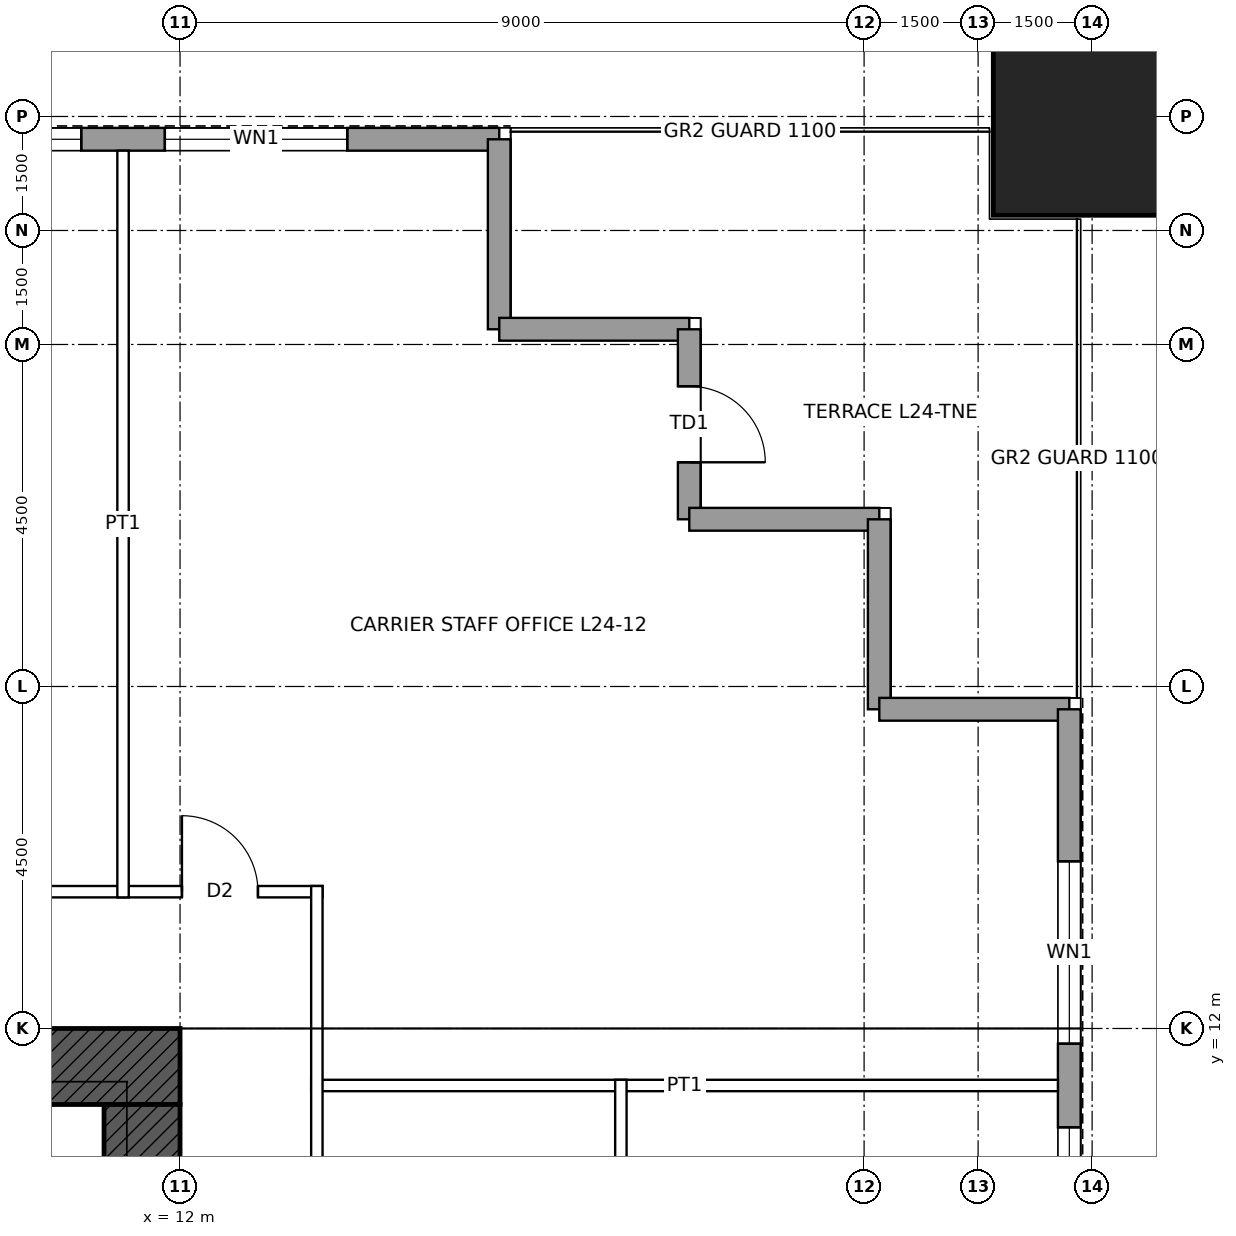
"""IFC4 building model, lengths in metres.
Left out: names, types, materials, properties, quantities, classifications, styles, units other than length and angle.
Written with IfcOpenShell. Run it as: python <this file> out.ifc"""

import sys

from ifc_helpers import new_model, si_unit, direction, frame, frame_2d, origin, origin_2d, place, context, subcontext, project, spatial, rectangle, hollow_rectangle, extrude, element, fill, save


model = new_model("IFC4")
c1 = context("Model", 3, precision=1e-05, world=origin(), true_north=direction((0.0, 1.0)))
c2 = subcontext(c1, "Body", "Model", "MODEL_VIEW")
j1 = project(units=[si_unit("LENGTHUNIT", "METRE"), si_unit("PLANEANGLEUNIT", "RADIAN")], contexts=[c1])
p1 = place(None, origin())
s1 = spatial("IfcSite", under=j1, at=p1, CompositionType="ELEMENT")
p2 = place(p1, origin())
s2 = spatial("IfcBuilding", under=s1, at=p2, CompositionType="ELEMENT")
p3 = place(p2, frame((0.0, 0.0, 122.4)))
s3 = spatial("IfcBuildingStorey", under=s2, at=p3, CompositionType="ELEMENT", Elevation=122.4)
p4 = place(p3, frame((24.0, 24.0, 0.0), z_axis=(0.0, 0.0, 1.0), x_axis=(1.0, 0.0, 0.0)))
e1 = element("IfcColumn", 1, at=p4, inside=s3, PredefinedType="COLUMN", context=c2, shape_type="SweptSolid", body=[
    extrude(hollow_rectangle(XDim=2.6, YDim=2.6, WallThickness=0.13, at=origin_2d()), origin(), (0.0, 0.0, 1.0), 4.5),
])
p5 = place(p3, frame((-12.0, 11.5, 0.0), z_axis=(0.0, 0.0, 1.0), x_axis=(1.0, 0.0, 0.0)))
e2 = element("IfcWall", 2, at=p5, inside=s3, PredefinedType="SHEAR", context=c2, shape_type="SweptSolid", body=[
    extrude(rectangle(XDim=24.0, YDim=1.0, at=frame_2d((12.0, 0.0))), origin(), (0.0, 0.0, 1.0), 4.5),
])
p6 = place(p5, frame((6.25, 0.0, 0.0)))
e3 = element("IfcOpeningElement", 3, at=p6, cuts=e2, PredefinedType="OPENING", context=c2, shape_type="SweptSolid", body=[
    extrude(rectangle(XDim=1.0, YDim=2.4, at=frame_2d((0.5, 1.2))), frame((0.0, 0.51, 0.0), z_axis=(0.0, -1.0, 0.0), x_axis=(1.0, 0.0, 0.0)), (0.0, 0.0, 1.0), 1.02),
])
p7 = place(p5, frame((16.75, 0.0, 0.0)))
e4 = element("IfcOpeningElement", 4, at=p7, cuts=e2, PredefinedType="OPENING", context=c2, shape_type="SweptSolid", body=[
    extrude(rectangle(XDim=1.0, YDim=2.4, at=frame_2d((0.5, 1.2))), frame((0.0, 0.51, 0.0), z_axis=(0.0, -1.0, 0.0), x_axis=(1.0, 0.0, 0.0)), (0.0, 0.0, 1.0), 1.02),
])
p8 = place(p3, frame((11.5, 11.0, 0.0), z_axis=(0.0, 0.0, 1.0), x_axis=(0.0, -1.0, 0.0)))
e5 = element("IfcWall", 5, at=p8, inside=s3, PredefinedType="SHEAR", context=c2, shape_type="SweptSolid", body=[
    extrude(rectangle(XDim=22.0, YDim=1.0, at=frame_2d((11.0, 0.0))), origin(), (0.0, 0.0, 1.0), 4.5),
])
p9 = place(p8, frame((10.5, 0.0, 0.0)))
e6 = element("IfcOpeningElement", 6, at=p9, cuts=e5, PredefinedType="OPENING", context=c2, shape_type="SweptSolid", body=[
    extrude(rectangle(XDim=1.0, YDim=2.4, at=frame_2d((0.5, 1.2))), frame((0.0, 0.51, 0.0), z_axis=(0.0, -1.0, 0.0), x_axis=(1.0, 0.0, 0.0)), (0.0, 0.0, 1.0), 1.02),
])
p10 = place(p3, frame((-16.2, 23.7, 0.0), z_axis=(0.0, 0.0, 1.0), x_axis=(1.0, 0.0, 0.0)))
e7 = element("IfcWall", 7, at=p10, inside=s3, PredefinedType="SOLIDWALL", context=c2, shape_type="SweptSolid", body=[
    extrude(rectangle(XDim=32.4, YDim=0.3, at=frame_2d((16.2, 0.0))), origin(), (0.0, 0.0, 1.0), 4.3),
])
p11 = place(p10, frame((2.0, 0.0, 1.0)))
e8 = element("IfcOpeningElement", 8, at=p11, cuts=e7, PredefinedType="OPENING", context=c2, shape_type="SweptSolid", body=[
    extrude(rectangle(XDim=2.4, YDim=1.2, at=frame_2d((1.2, 0.6))), frame((0.0, 0.16, 0.0), z_axis=(0.0, -1.0, 0.0), x_axis=(1.0, 0.0, 0.0)), (0.0, 0.0, 1.0), 0.32),
])
p12 = place(p10, frame((5.5, 0.0, 1.0)))
e9 = element("IfcOpeningElement", 9, at=p12, cuts=e7, PredefinedType="OPENING", context=c2, shape_type="SweptSolid", body=[
    extrude(rectangle(XDim=2.4, YDim=1.2, at=frame_2d((1.2, 0.6))), frame((0.0, 0.16, 0.0), z_axis=(0.0, -1.0, 0.0), x_axis=(1.0, 0.0, 0.0)), (0.0, 0.0, 1.0), 0.32),
])
p13 = place(p10, frame((8.6, 0.0, 1.0)))
e10 = element("IfcOpeningElement", 10, at=p13, cuts=e7, PredefinedType="OPENING", context=c2, shape_type="SweptSolid", body=[
    extrude(rectangle(XDim=2.4, YDim=1.2, at=frame_2d((1.2, 0.6))), frame((0.0, 0.16, 0.0), z_axis=(0.0, -1.0, 0.0), x_axis=(1.0, 0.0, 0.0)), (0.0, 0.0, 1.0), 0.32),
])
p14 = place(p10, frame((13.65, 0.0, 1.0)))
e11 = element("IfcOpeningElement", 11, at=p14, cuts=e7, PredefinedType="OPENING", context=c2, shape_type="SweptSolid", body=[
    extrude(rectangle(XDim=2.4, YDim=1.2, at=frame_2d((1.2, 0.6))), frame((0.0, 0.16, 0.0), z_axis=(0.0, -1.0, 0.0), x_axis=(1.0, 0.0, 0.0)), (0.0, 0.0, 1.0), 0.32),
])
p15 = place(p10, frame((16.35, 0.0, 1.0)))
e12 = element("IfcOpeningElement", 12, at=p15, cuts=e7, PredefinedType="OPENING", context=c2, shape_type="SweptSolid", body=[
    extrude(rectangle(XDim=2.4, YDim=1.2, at=frame_2d((1.2, 0.6))), frame((0.0, 0.16, 0.0), z_axis=(0.0, -1.0, 0.0), x_axis=(1.0, 0.0, 0.0)), (0.0, 0.0, 1.0), 0.32),
])
p16 = place(p10, frame((21.4, 0.0, 1.0)))
e13 = element("IfcOpeningElement", 13, at=p16, cuts=e7, PredefinedType="OPENING", context=c2, shape_type="SweptSolid", body=[
    extrude(rectangle(XDim=2.4, YDim=1.2, at=frame_2d((1.2, 0.6))), frame((0.0, 0.16, 0.0), z_axis=(0.0, -1.0, 0.0), x_axis=(1.0, 0.0, 0.0)), (0.0, 0.0, 1.0), 0.32),
])
p17 = place(p10, frame((24.5, 0.0, 1.0)))
e14 = element("IfcOpeningElement", 14, at=p17, cuts=e7, PredefinedType="OPENING", context=c2, shape_type="SweptSolid", body=[
    extrude(rectangle(XDim=2.4, YDim=1.2, at=frame_2d((1.2, 0.6))), frame((0.0, 0.16, 0.0), z_axis=(0.0, -1.0, 0.0), x_axis=(1.0, 0.0, 0.0)), (0.0, 0.0, 1.0), 0.32),
])
p18 = place(p10, frame((28.0, 0.0, 1.0)))
e15 = element("IfcOpeningElement", 15, at=p18, cuts=e7, PredefinedType="OPENING", context=c2, shape_type="SweptSolid", body=[
    extrude(rectangle(XDim=2.4, YDim=1.2, at=frame_2d((1.2, 0.6))), frame((0.0, 0.16, 0.0), z_axis=(0.0, -1.0, 0.0), x_axis=(1.0, 0.0, 0.0)), (0.0, 0.0, 1.0), 0.32),
])
for number, where, z_axis, x_axis in (
    (16, (16.2, 23.7, 0.0), (0.0, 0.0, 1.0), (0.0, -1.0, 0.0)),
    (17, (16.2, 21.2, 0.0), (0.0, 0.0, 1.0), (1.0, 0.0, 0.0)),
):
    element("IfcWall", number, at=place(p3, frame(where, z_axis=z_axis, x_axis=x_axis)), inside=s3, PredefinedType="SOLIDWALL", context=c2, shape_type="SweptSolid", body=[
        extrude(rectangle(XDim=2.5, YDim=0.3, at=frame_2d((1.25, 0.0))), origin(), (0.0, 0.0, 1.0), 4.3),
    ])
p19 = place(p3, frame((18.7, 21.2, 0.0), z_axis=(0.0, 0.0, 1.0), x_axis=(0.0, -1.0, 0.0)))
e18 = element("IfcWall", 18, at=p19, inside=s3, PredefinedType="SOLIDWALL", context=c2, shape_type="SweptSolid", body=[
    extrude(rectangle(XDim=2.5, YDim=0.3, at=frame_2d((1.25, 0.0))), origin(), (0.0, 0.0, 1.0), 4.3),
])
p20 = place(p19, frame((0.75, 0.0, 0.0)))
e19 = element("IfcOpeningElement", 19, at=p20, cuts=e18, PredefinedType="OPENING", context=c2, shape_type="SweptSolid", body=[
    extrude(rectangle(XDim=1.0, YDim=2.4, at=frame_2d((0.5, 1.2))), frame((0.0, 0.16, 0.0), z_axis=(0.0, -1.0, 0.0), x_axis=(1.0, 0.0, 0.0)), (0.0, 0.0, 1.0), 0.32),
])
for number, where, z_axis, x_axis in (
    (20, (18.7, 18.7, 0.0), (0.0, 0.0, 1.0), (1.0, 0.0, 0.0)),
    (21, (21.2, 18.7, 0.0), (0.0, 0.0, 1.0), (0.0, -1.0, 0.0)),
    (22, (21.2, 16.2, 0.0), (0.0, 0.0, 1.0), (1.0, 0.0, 0.0)),
):
    element("IfcWall", number, at=place(p3, frame(where, z_axis=z_axis, x_axis=x_axis)), inside=s3, PredefinedType="SOLIDWALL", context=c2, shape_type="SweptSolid", body=[
        extrude(rectangle(XDim=2.5, YDim=0.3, at=frame_2d((1.25, 0.0))), origin(), (0.0, 0.0, 1.0), 4.3),
    ])
p21 = place(p3, frame((23.7, 16.2, 0.0), z_axis=(0.0, 0.0, 1.0), x_axis=(0.0, -1.0, 0.0)))
e23 = element("IfcWall", 23, at=p21, inside=s3, PredefinedType="SOLIDWALL", context=c2, shape_type="SweptSolid", body=[
    extrude(rectangle(XDim=32.4, YDim=0.3, at=frame_2d((16.2, 0.0))), origin(), (0.0, 0.0, 1.0), 4.3),
])
p22 = place(p21, frame((2.0, 0.0, 1.0)))
e24 = element("IfcOpeningElement", 24, at=p22, cuts=e23, PredefinedType="OPENING", context=c2, shape_type="SweptSolid", body=[
    extrude(rectangle(XDim=2.4, YDim=1.2, at=frame_2d((1.2, 0.6))), frame((0.0, 0.16, 0.0), z_axis=(0.0, -1.0, 0.0), x_axis=(1.0, 0.0, 0.0)), (0.0, 0.0, 1.0), 0.32),
])
p23 = place(p21, frame((5.5, 0.0, 1.0)))
e25 = element("IfcOpeningElement", 25, at=p23, cuts=e23, PredefinedType="OPENING", context=c2, shape_type="SweptSolid", body=[
    extrude(rectangle(XDim=2.4, YDim=1.2, at=frame_2d((1.2, 0.6))), frame((0.0, 0.16, 0.0), z_axis=(0.0, -1.0, 0.0), x_axis=(1.0, 0.0, 0.0)), (0.0, 0.0, 1.0), 0.32),
])
p24 = place(p21, frame((8.6, 0.0, 1.0)))
e26 = element("IfcOpeningElement", 26, at=p24, cuts=e23, PredefinedType="OPENING", context=c2, shape_type="SweptSolid", body=[
    extrude(rectangle(XDim=2.4, YDim=1.2, at=frame_2d((1.2, 0.6))), frame((0.0, 0.16, 0.0), z_axis=(0.0, -1.0, 0.0), x_axis=(1.0, 0.0, 0.0)), (0.0, 0.0, 1.0), 0.32),
])
p25 = place(p21, frame((13.65, 0.0, 1.0)))
e27 = element("IfcOpeningElement", 27, at=p25, cuts=e23, PredefinedType="OPENING", context=c2, shape_type="SweptSolid", body=[
    extrude(rectangle(XDim=2.4, YDim=1.2, at=frame_2d((1.2, 0.6))), frame((0.0, 0.16, 0.0), z_axis=(0.0, -1.0, 0.0), x_axis=(1.0, 0.0, 0.0)), (0.0, 0.0, 1.0), 0.32),
])
p26 = place(p21, frame((16.35, 0.0, 1.0)))
e28 = element("IfcOpeningElement", 28, at=p26, cuts=e23, PredefinedType="OPENING", context=c2, shape_type="SweptSolid", body=[
    extrude(rectangle(XDim=2.4, YDim=1.2, at=frame_2d((1.2, 0.6))), frame((0.0, 0.16, 0.0), z_axis=(0.0, -1.0, 0.0), x_axis=(1.0, 0.0, 0.0)), (0.0, 0.0, 1.0), 0.32),
])
p27 = place(p21, frame((21.4, 0.0, 1.0)))
e29 = element("IfcOpeningElement", 29, at=p27, cuts=e23, PredefinedType="OPENING", context=c2, shape_type="SweptSolid", body=[
    extrude(rectangle(XDim=2.4, YDim=1.2, at=frame_2d((1.2, 0.6))), frame((0.0, 0.16, 0.0), z_axis=(0.0, -1.0, 0.0), x_axis=(1.0, 0.0, 0.0)), (0.0, 0.0, 1.0), 0.32),
])
p28 = place(p21, frame((24.5, 0.0, 1.0)))
e30 = element("IfcOpeningElement", 30, at=p28, cuts=e23, PredefinedType="OPENING", context=c2, shape_type="SweptSolid", body=[
    extrude(rectangle(XDim=2.4, YDim=1.2, at=frame_2d((1.2, 0.6))), frame((0.0, 0.16, 0.0), z_axis=(0.0, -1.0, 0.0), x_axis=(1.0, 0.0, 0.0)), (0.0, 0.0, 1.0), 0.32),
])
p29 = place(p21, frame((28.0, 0.0, 1.0)))
e31 = element("IfcOpeningElement", 31, at=p29, cuts=e23, PredefinedType="OPENING", context=c2, shape_type="SweptSolid", body=[
    extrude(rectangle(XDim=2.4, YDim=1.2, at=frame_2d((1.2, 0.6))), frame((0.0, 0.16, 0.0), z_axis=(0.0, -1.0, 0.0), x_axis=(1.0, 0.0, 0.0)), (0.0, 0.0, 1.0), 0.32),
])
p30 = place(p3, frame((13.725, 11.25, 0.0), z_axis=(0.0, 0.0, 1.0), x_axis=(1.0, 0.0, 0.0)))
e32 = element("IfcWall", 32, at=p30, inside=s3, PredefinedType="PARTITIONING", context=c2, shape_type="SweptSolid", body=[
    extrude(rectangle(XDim=9.825, YDim=0.15, at=frame_2d((4.913, 0.0))), origin(), (0.0, 0.0, 1.0), 3.431),
])
p31 = place(p3, frame((-13.875, 13.8, 0.0), z_axis=(0.0, 0.0, 1.0), x_axis=(1.0, 0.0, 0.0)))
e33 = element("IfcWall", 33, at=p31, inside=s3, PredefinedType="PARTITIONING", context=c2, shape_type="SweptSolid", body=[
    extrude(rectangle(XDim=27.75, YDim=0.15, at=frame_2d((13.875, 0.0))), origin(), (0.0, 0.0, 1.0), 4.3),
])
p32 = place(p31, frame((5.475, 0.0, 0.0)))
e34 = element("IfcOpeningElement", 34, at=p32, cuts=e33, PredefinedType="OPENING", context=c2, shape_type="SweptSolid", body=[
    extrude(rectangle(XDim=1.8, YDim=2.4, at=frame_2d((0.9, 1.2))), frame((0.0, 0.085, 0.0), z_axis=(0.0, -1.0, 0.0), x_axis=(1.0, 0.0, 0.0)), (0.0, 0.0, 1.0), 0.17),
])
p33 = place(p31, frame((13.375, 0.0, 0.0)))
e35 = element("IfcOpeningElement", 35, at=p33, cuts=e33, PredefinedType="OPENING", context=c2, shape_type="SweptSolid", body=[
    extrude(rectangle(XDim=1.0, YDim=2.1, at=frame_2d((0.5, 1.05))), frame((0.0, 0.085, 0.0), z_axis=(0.0, -1.0, 0.0), x_axis=(1.0, 0.0, 0.0)), (0.0, 0.0, 1.0), 0.17),
])
p34 = place(p31, frame((20.475, 0.0, 0.0)))
e36 = element("IfcOpeningElement", 36, at=p34, cuts=e33, PredefinedType="OPENING", context=c2, shape_type="SweptSolid", body=[
    extrude(rectangle(XDim=1.8, YDim=2.4, at=frame_2d((0.9, 1.2))), frame((0.0, 0.085, 0.0), z_axis=(0.0, -1.0, 0.0), x_axis=(1.0, 0.0, 0.0)), (0.0, 0.0, 1.0), 0.17),
])
p35 = place(p31, frame((25.9, 0.0, 0.0)))
e37 = element("IfcOpeningElement", 37, at=p35, cuts=e33, PredefinedType="OPENING", context=c2, shape_type="SweptSolid", body=[
    extrude(rectangle(XDim=1.0, YDim=2.1, at=frame_2d((0.5, 1.05))), frame((0.0, 0.085, 0.0), z_axis=(0.0, -1.0, 0.0), x_axis=(1.0, 0.0, 0.0)), (0.0, 0.0, 1.0), 0.17),
])
p36 = place(p31, frame((0.85, 0.0, 0.0)))
e38 = element("IfcOpeningElement", 38, at=p36, cuts=e33, PredefinedType="OPENING", context=c2, shape_type="SweptSolid", body=[
    extrude(rectangle(XDim=1.0, YDim=2.1, at=frame_2d((0.5, 1.05))), frame((0.0, 0.085, 0.0), z_axis=(0.0, -1.0, 0.0), x_axis=(1.0, 0.0, 0.0)), (0.0, 0.0, 1.0), 0.17),
])
p37 = place(p3, frame((11.25, 13.725, 0.0), z_axis=(0.0, 0.0, 1.0), x_axis=(0.0, 1.0, 0.0)))
e39 = element("IfcWall", 39, at=p37, inside=s3, PredefinedType="PARTITIONING", context=c2, shape_type="SweptSolid", body=[
    extrude(rectangle(XDim=9.825, YDim=0.15, at=frame_2d((4.913, 0.0))), origin(), (0.0, 0.0, 1.0), 3.431),
])
p38 = place(p3, frame((13.8, -13.875, 0.0), z_axis=(0.0, 0.0, 1.0), x_axis=(0.0, 1.0, 0.0)))
e40 = element("IfcWall", 40, at=p38, inside=s3, PredefinedType="PARTITIONING", context=c2, shape_type="SweptSolid", body=[
    extrude(rectangle(XDim=27.75, YDim=0.15, at=frame_2d((13.875, 0.0))), origin(), (0.0, 0.0, 1.0), 4.3),
])
p39 = place(p38, frame((20.875, 0.0, 0.0)))
e41 = element("IfcOpeningElement", 41, at=p39, cuts=e40, PredefinedType="OPENING", context=c2, shape_type="SweptSolid", body=[
    extrude(rectangle(XDim=1.0, YDim=2.1, at=frame_2d((0.5, 1.05))), frame((0.0, 0.085, 0.0), z_axis=(0.0, -1.0, 0.0), x_axis=(1.0, 0.0, 0.0)), (0.0, 0.0, 1.0), 0.17),
])
p40 = place(p38, frame((9.225, 0.0, 0.0)))
e42 = element("IfcOpeningElement", 42, at=p40, cuts=e40, PredefinedType="OPENING", context=c2, shape_type="SweptSolid", body=[
    extrude(rectangle(XDim=1.8, YDim=2.4, at=frame_2d((0.9, 1.2))), frame((0.0, 0.085, 0.0), z_axis=(0.0, -1.0, 0.0), x_axis=(1.0, 0.0, 0.0)), (0.0, 0.0, 1.0), 0.17),
])
p41 = place(p3, frame((17.8, 3.675, 0.0), z_axis=(0.0, 0.0, 1.0), x_axis=(0.0, 1.0, 0.0)))
e43 = element("IfcWall", 43, at=p41, inside=s3, PredefinedType="PARTITIONING", context=c2, shape_type="SweptSolid", body=[
    extrude(rectangle(XDim=7.65, YDim=0.15, at=frame_2d((3.825, 0.0))), origin(), (0.0, 0.0, 1.0), 4.3),
])
p42 = place(p17, origin())
e44 = element("IfcWindow", 44, at=p42, inside=s3, PartitioningType="SINGLE_PANEL", PredefinedType="WINDOW", context=c2, shape_type="SweptSolid", body=[
    extrude(rectangle(XDim=2.4, YDim=1.2, at=frame_2d((1.2, 0.6))), frame((0.0, 0.03, 0.0), z_axis=(0.0, -1.0, 0.0), x_axis=(1.0, 0.0, 0.0)), (0.0, 0.0, 1.0), 0.06),
])
fill(e14, e44)
p43 = place(p18, origin())
e45 = element("IfcWindow", 45, at=p43, inside=s3, PartitioningType="SINGLE_PANEL", PredefinedType="WINDOW", context=c2, shape_type="SweptSolid", body=[
    extrude(rectangle(XDim=2.4, YDim=1.2, at=frame_2d((1.2, 0.6))), frame((0.0, 0.03, 0.0), z_axis=(0.0, -1.0, 0.0), x_axis=(1.0, 0.0, 0.0)), (0.0, 0.0, 1.0), 0.06),
])
fill(e15, e45)
p44 = place(p20, origin())
e46 = element("IfcDoor", 46, at=p44, inside=s3, OperationType="SINGLE_SWING_RIGHT", PredefinedType="DOOR", context=c2, shape_type="SweptSolid", body=[
    extrude(rectangle(XDim=1.0, YDim=2.4, at=frame_2d((0.5, 1.2))), frame((0.0, 0.025, 0.0), z_axis=(0.0, -1.0, 0.0), x_axis=(1.0, 0.0, 0.0)), (0.0, 0.0, 1.0), 0.05),
])
fill(e19, e46)
p45 = place(p22, origin())
e47 = element("IfcWindow", 47, at=p45, inside=s3, PartitioningType="SINGLE_PANEL", PredefinedType="WINDOW", context=c2, shape_type="SweptSolid", body=[
    extrude(rectangle(XDim=2.4, YDim=1.2, at=frame_2d((1.2, 0.6))), frame((0.0, 0.03, 0.0), z_axis=(0.0, -1.0, 0.0), x_axis=(1.0, 0.0, 0.0)), (0.0, 0.0, 1.0), 0.06),
])
fill(e24, e47)
p46 = place(p23, origin())
e48 = element("IfcWindow", 48, at=p46, inside=s3, PartitioningType="SINGLE_PANEL", PredefinedType="WINDOW", context=c2, shape_type="SweptSolid", body=[
    extrude(rectangle(XDim=2.4, YDim=1.2, at=frame_2d((1.2, 0.6))), frame((0.0, 0.03, 0.0), z_axis=(0.0, -1.0, 0.0), x_axis=(1.0, 0.0, 0.0)), (0.0, 0.0, 1.0), 0.06),
])
fill(e25, e48)
p47 = place(p35, origin())
e49 = element("IfcDoor", 49, at=p47, inside=s3, OperationType="SINGLE_SWING_LEFT", PredefinedType="DOOR", context=c2, shape_type="SweptSolid", body=[
    extrude(rectangle(XDim=1.0, YDim=2.1, at=frame_2d((0.5, 1.05))), frame((0.0, 0.025, 0.0), z_axis=(0.0, -1.0, 0.0), x_axis=(1.0, 0.0, 0.0)), (0.0, 0.0, 1.0), 0.05),
])
fill(e37, e49)
save(model, sys.argv[1])
